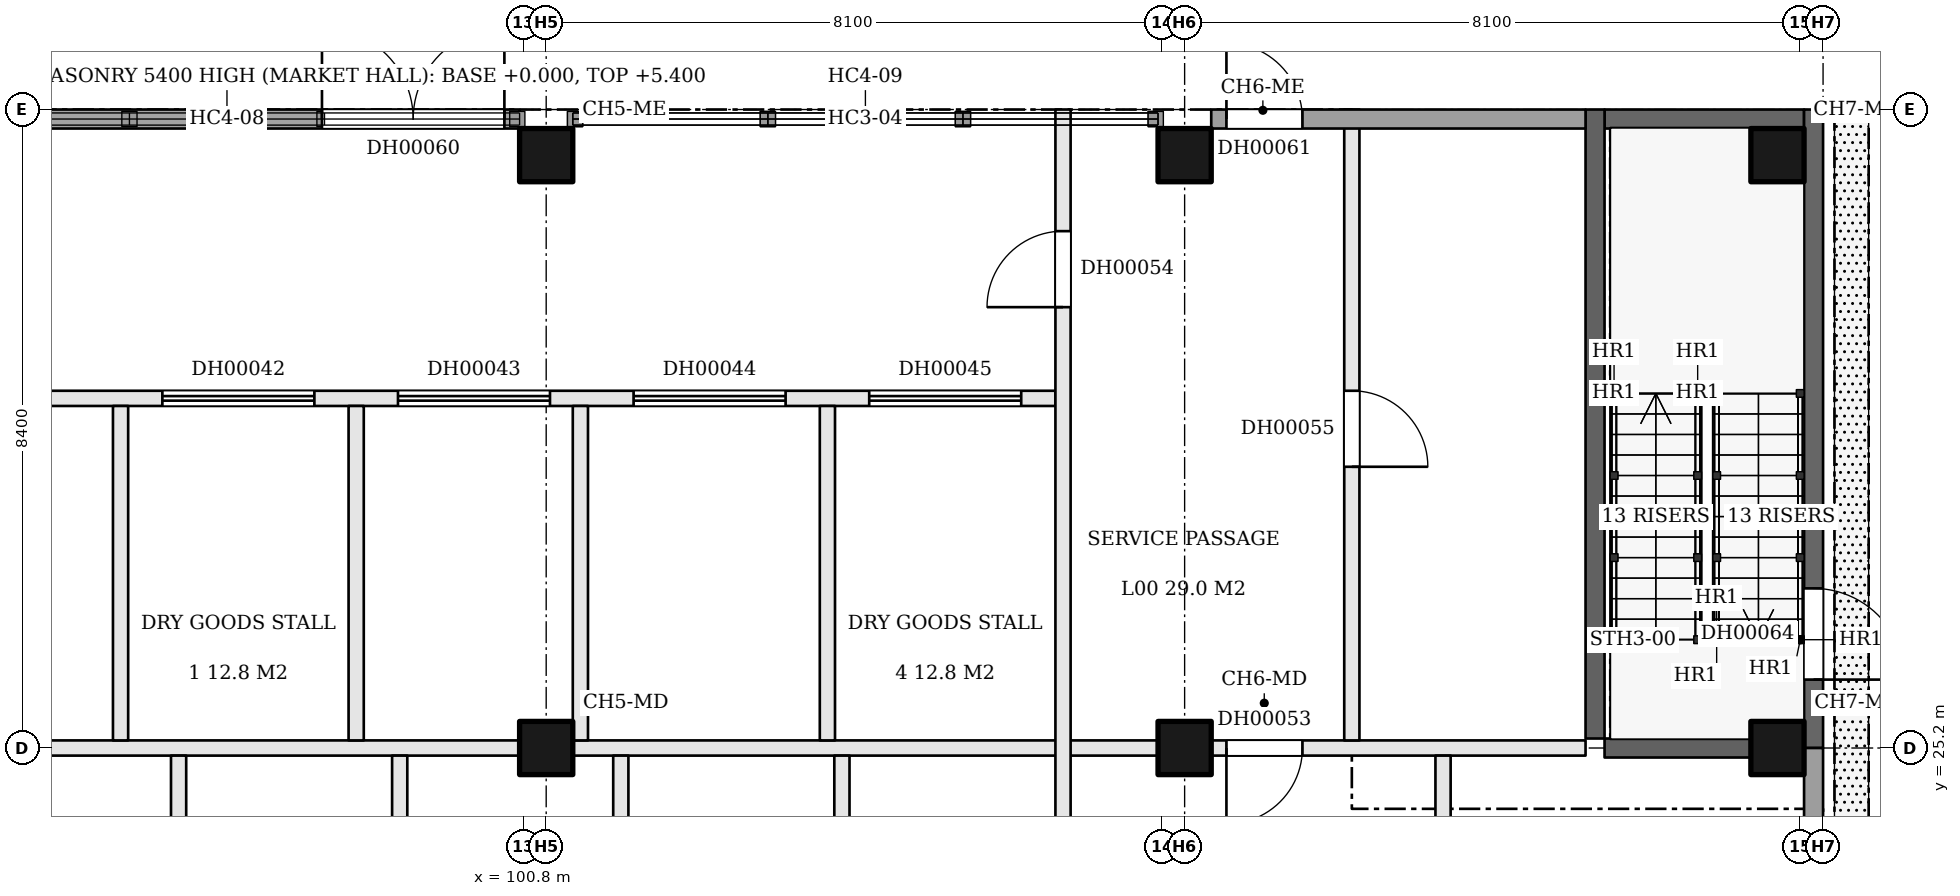
"""IFC4 building model, lengths in metres.
Left out: names, types, materials, properties, quantities, classifications, styles, units other than length and angle.
Written with IfcOpenShell. Run it as: python <this file> out.ifc"""

import sys

from ifc_helpers import new_model, si_unit, direction, frame, frame_2d, origin, origin_2d, place, context, subcontext, project, spatial, rectangle, extrude, element, fill, save


model = new_model("IFC4")
c1 = context("Model", 3, precision=1e-05, world=origin(), true_north=direction((0.0, 1.0)))
c2 = subcontext(c1, "Body", "Model", "MODEL_VIEW")
j1 = project(units=[si_unit("LENGTHUNIT", "METRE"), si_unit("PLANEANGLEUNIT", "RADIAN")], contexts=[c1])
p1 = place(None, origin())
s1 = spatial("IfcSite", under=j1, at=p1, CompositionType="ELEMENT")
p2 = place(p1, origin())
s2 = spatial("IfcBuilding", under=s1, at=p2, CompositionType="ELEMENT")
p3 = place(p2, origin())
s3 = spatial("IfcBuildingStorey", under=s2, at=p3, CompositionType="ELEMENT", Elevation=0.0)
for number, where, z_axis, x_axis in (
    (1, (101.1, 25.2, -0.2), (0.0, 0.0, 1.0), (1.0, 0.0, 0.0)),
    (2, (101.1, 33.0, -0.2), (0.0, 0.0, 1.0), (1.0, 0.0, 0.0)),
    (3, (109.5, 25.2, -0.2), (0.0, 0.0, 1.0), (1.0, 0.0, 0.0)),
    (4, (109.5, 33.0, -0.2), (0.0, 0.0, 1.0), (1.0, 0.0, 0.0)),
):
    element("IfcColumn", number, at=place(p3, frame(where, z_axis=z_axis, x_axis=x_axis)), inside=s3, PredefinedType="COLUMN", context=c2, shape_type="SweptSolid", body=[
        extrude(rectangle(XDim=0.7, YDim=0.7, at=origin_2d()), origin(), (0.0, 0.0, 1.0), 8.9),
    ])
for number, where, z_axis, x_axis in (
    (5, (117.3, 25.2, 0.0), (0.0, 0.0, 1.0), (1.0, 0.0, 0.0)),
    (6, (117.3, 33.0, 0.0), (0.0, 0.0, 1.0), (1.0, 0.0, 0.0)),
):
    element("IfcColumn", number, at=place(p3, frame(where, z_axis=z_axis, x_axis=x_axis)), inside=s3, PredefinedType="COLUMN", context=c2, shape_type="SweptSolid", body=[
        extrude(rectangle(XDim=0.7, YDim=0.7, at=origin_2d()), origin(), (0.0, 0.0, 1.0), 8.7),
    ])
for number, where, z_axis, x_axis in (
    (7, (93.05, 25.2, 0.0), (0.0, 0.0, 1.0), (1.0, 0.0, 0.0)),
    (8, (101.45, 25.2, 0.0), (0.0, 0.0, 1.0), (1.0, 0.0, 0.0)),
):
    element("IfcWall", number, at=place(p3, frame(where, z_axis=z_axis, x_axis=x_axis)), inside=s3, PredefinedType="PARTITIONING", context=c2, shape_type="SweptSolid", body=[
        extrude(rectangle(XDim=7.7, YDim=0.2, at=frame_2d((3.85, 0.0))), origin(), (0.0, 0.0, 1.0), 8.7),
    ])
p4 = place(p3, frame((109.85, 25.2, 0.0), z_axis=(0.0, 0.0, 1.0), x_axis=(1.0, 0.0, 0.0)))
e9 = element("IfcWall", 9, at=p4, inside=s3, PredefinedType="PARTITIONING", context=c2, shape_type="SweptSolid", body=[
    extrude(rectangle(XDim=4.925, YDim=0.2, at=frame_2d((2.462, 0.0))), origin(), (0.0, 0.0, 1.0), 8.7),
])
p5 = place(p4, frame((0.2, 0.0, 0.0)))
e10 = element("IfcOpeningElement", 10, at=p5, cuts=e9, PredefinedType="OPENING", context=c2, shape_type="SweptSolid", body=[
    extrude(rectangle(XDim=1.0, YDim=2.1, at=frame_2d((0.5, 1.05))), frame((0.0, 0.11, 0.0), z_axis=(0.0, -1.0, 0.0), x_axis=(1.0, 0.0, 0.0)), (0.0, 0.0, 1.0), 0.22),
])
p6 = place(p3, frame((115.025, 25.2, 0.0), z_axis=(0.0, 0.0, 1.0), x_axis=(1.0, 0.0, 0.0)))
e11 = element("IfcWall", 11, at=p6, inside=s3, PredefinedType="SHEAR", context=c2, shape_type="SweptSolid", body=[
    extrude(rectangle(XDim=1.925, YDim=0.25, at=frame_2d((0.962, 0.0))), origin(), (0.0, 0.0, 1.0), 8.7),
])
p7 = place(p3, frame((76.025, 29.8, 0.0), z_axis=(0.0, 0.0, 1.0), x_axis=(1.0, 0.0, 0.0)))
e12 = element("IfcWall", 12, at=p7, inside=s3, PredefinedType="PARTITIONING", context=c2, shape_type="SweptSolid", body=[
    extrude(rectangle(XDim=31.775, YDim=0.2, at=frame_2d((15.888, 0.0))), origin(), (0.0, 0.0, 1.0), 8.7),
])
p8 = place(p7, frame((1.538, 0.0, 0.0)))
e13 = element("IfcOpeningElement", 13, at=p8, cuts=e12, PredefinedType="OPENING", context=c2, shape_type="SweptSolid", body=[
    extrude(rectangle(XDim=1.0, YDim=2.1, at=frame_2d((0.5, 1.05))), frame((0.0, 0.11, 0.0), z_axis=(0.0, -1.0, 0.0), x_axis=(1.0, 0.0, 0.0)), (0.0, 0.0, 1.0), 0.22),
])
p9 = place(p7, frame((5.675, 0.0, 0.0)))
e14 = element("IfcOpeningElement", 14, at=p9, cuts=e12, PredefinedType="OPENING", context=c2, shape_type="SweptSolid", body=[
    extrude(rectangle(XDim=1.0, YDim=2.1, at=frame_2d((0.5, 1.05))), frame((0.0, 0.11, 0.0), z_axis=(0.0, -1.0, 0.0), x_axis=(1.0, 0.0, 0.0)), (0.0, 0.0, 1.0), 0.22),
])
p10 = place(p7, frame((9.175, 0.0, 0.0)))
e15 = element("IfcOpeningElement", 15, at=p10, cuts=e12, PredefinedType="OPENING", context=c2, shape_type="SweptSolid", body=[
    extrude(rectangle(XDim=1.0, YDim=2.1, at=frame_2d((0.5, 1.05))), frame((0.0, 0.11, 0.0), z_axis=(0.0, -1.0, 0.0), x_axis=(1.0, 0.0, 0.0)), (0.0, 0.0, 1.0), 0.22),
])
p11 = place(p7, frame((14.775, 0.0, 0.0)))
e16 = element("IfcOpeningElement", 16, at=p11, cuts=e12, PredefinedType="OPENING", context=c2, shape_type="SweptSolid", body=[
    extrude(rectangle(XDim=1.0, YDim=2.1, at=frame_2d((0.5, 1.05))), frame((0.0, 0.11, 0.0), z_axis=(0.0, -1.0, 0.0), x_axis=(1.0, 0.0, 0.0)), (0.0, 0.0, 1.0), 0.22),
])
p12 = place(p7, frame((20.025, 0.0, 0.0)))
e17 = element("IfcOpeningElement", 17, at=p12, cuts=e12, PredefinedType="OPENING", context=c2, shape_type="SweptSolid", body=[
    extrude(rectangle(XDim=2.0, YDim=2.4, at=frame_2d((1.0, 1.2))), frame((0.0, 0.11, 0.0), z_axis=(0.0, -1.0, 0.0), x_axis=(1.0, 0.0, 0.0)), (0.0, 0.0, 1.0), 0.22),
])
p13 = place(p7, frame((23.125, 0.0, 0.0)))
e18 = element("IfcOpeningElement", 18, at=p13, cuts=e12, PredefinedType="OPENING", context=c2, shape_type="SweptSolid", body=[
    extrude(rectangle(XDim=2.0, YDim=2.4, at=frame_2d((1.0, 1.2))), frame((0.0, 0.11, 0.0), z_axis=(0.0, -1.0, 0.0), x_axis=(1.0, 0.0, 0.0)), (0.0, 0.0, 1.0), 0.22),
])
p14 = place(p7, frame((26.225, 0.0, 0.0)))
e19 = element("IfcOpeningElement", 19, at=p14, cuts=e12, PredefinedType="OPENING", context=c2, shape_type="SweptSolid", body=[
    extrude(rectangle(XDim=2.0, YDim=2.4, at=frame_2d((1.0, 1.2))), frame((0.0, 0.11, 0.0), z_axis=(0.0, -1.0, 0.0), x_axis=(1.0, 0.0, 0.0)), (0.0, 0.0, 1.0), 0.22),
])
p15 = place(p7, frame((29.325, 0.0, 0.0)))
e20 = element("IfcOpeningElement", 20, at=p15, cuts=e12, PredefinedType="OPENING", context=c2, shape_type="SweptSolid", body=[
    extrude(rectangle(XDim=2.0, YDim=2.4, at=frame_2d((1.0, 1.2))), frame((0.0, 0.11, 0.0), z_axis=(0.0, -1.0, 0.0), x_axis=(1.0, 0.0, 0.0)), (0.0, 0.0, 1.0), 0.22),
])
p16 = place(p3, frame((93.05, 33.475, 0.0), z_axis=(0.0, 0.0, 1.0), x_axis=(1.0, 0.0, 0.0)))
e21 = element("IfcWall", 21, at=p16, inside=s3, PredefinedType="SOLIDWALL", context=c2, shape_type="SweptSolid", body=[
    extrude(rectangle(XDim=7.7, YDim=0.25, at=frame_2d((3.85, 0.0))), origin(), (0.0, 0.0, 1.0), 5.4),
])
p17 = place(p16, frame((5.1, 0.0, 0.0)))
e22 = element("IfcOpeningElement", 22, at=p17, cuts=e21, PredefinedType="OPENING", context=c2, shape_type="SweptSolid", body=[
    extrude(rectangle(XDim=2.4, YDim=2.4, at=frame_2d((1.2, 1.2))), frame((0.0, 0.135, 0.0), z_axis=(0.0, -1.0, 0.0), x_axis=(1.0, 0.0, 0.0)), (0.0, 0.0, 1.0), 0.27),
])
p18 = place(p3, frame((109.85, 33.475, 0.0), z_axis=(0.0, 0.0, 1.0), x_axis=(1.0, 0.0, 0.0)))
e23 = element("IfcWall", 23, at=p18, inside=s3, PredefinedType="SOLIDWALL", context=c2, shape_type="SweptSolid", body=[
    extrude(rectangle(XDim=4.925, YDim=0.25, at=frame_2d((2.462, 0.0))), origin(), (0.0, 0.0, 1.0), 8.7),
])
p19 = place(p18, frame((0.2, 0.0, 0.0)))
e24 = element("IfcOpeningElement", 24, at=p19, cuts=e23, PredefinedType="OPENING", context=c2, shape_type="SweptSolid", body=[
    extrude(rectangle(XDim=1.0, YDim=2.1, at=frame_2d((0.5, 1.05))), frame((0.0, 0.135, 0.0), z_axis=(0.0, -1.0, 0.0), x_axis=(1.0, 0.0, 0.0)), (0.0, 0.0, 1.0), 0.27),
])
p20 = place(p3, frame((115.025, 33.475, 0.0), z_axis=(0.0, 0.0, 1.0), x_axis=(1.0, 0.0, 0.0)))
e25 = element("IfcWall", 25, at=p20, inside=s3, PredefinedType="SHEAR", context=c2, shape_type="SweptSolid", body=[
    extrude(rectangle(XDim=2.625, YDim=0.25, at=frame_2d((1.312, 0.0))), origin(), (0.0, 0.0, 1.0), 8.7),
])
p21 = place(p3, frame((95.5, 25.3, 0.0), z_axis=(0.0, 0.0, 1.0), x_axis=(0.0, 1.0, 0.0)))
e26 = element("IfcWall", 26, at=p21, inside=s3, PredefinedType="PARTITIONING", context=c2, shape_type="SweptSolid", body=[
    extrude(rectangle(XDim=4.4, YDim=0.2, at=frame_2d((2.2, 0.0))), origin(), (0.0, 0.0, 1.0), 8.7),
])
p22 = place(p3, frame((96.264, 21.5, 0.0), z_axis=(0.0, 0.0, 1.0), x_axis=(0.0, 1.0, 0.0)))
e27 = element("IfcWall", 27, at=p22, inside=s3, PredefinedType="PARTITIONING", context=c2, shape_type="SweptSolid", body=[
    extrude(rectangle(XDim=3.6, YDim=0.2, at=frame_2d((1.8, 0.0))), origin(), (0.0, 0.0, 1.0), 8.7),
])
p23 = place(p3, frame((98.6, 25.3, 0.0), z_axis=(0.0, 0.0, 1.0), x_axis=(0.0, 1.0, 0.0)))
e28 = element("IfcWall", 28, at=p23, inside=s3, PredefinedType="PARTITIONING", context=c2, shape_type="SweptSolid", body=[
    extrude(rectangle(XDim=4.4, YDim=0.2, at=frame_2d((2.2, 0.0))), origin(), (0.0, 0.0, 1.0), 8.7),
])
p24 = place(p3, frame((99.173, 21.5, 0.0), z_axis=(0.0, 0.0, 1.0), x_axis=(0.0, 1.0, 0.0)))
e29 = element("IfcWall", 29, at=p24, inside=s3, PredefinedType="PARTITIONING", context=c2, shape_type="SweptSolid", body=[
    extrude(rectangle(XDim=3.6, YDim=0.2, at=frame_2d((1.8, 0.0))), origin(), (0.0, 0.0, 1.0), 8.7),
])
p25 = place(p3, frame((101.55, 25.3, 0.0), z_axis=(0.0, 0.0, 1.0), x_axis=(0.0, 1.0, 0.0)))
e30 = element("IfcWall", 30, at=p25, inside=s3, PredefinedType="PARTITIONING", context=c2, shape_type="SweptSolid", body=[
    extrude(rectangle(XDim=4.4, YDim=0.2, at=frame_2d((2.2, 0.0))), origin(), (0.0, 0.0, 1.0), 8.7),
])
p26 = place(p3, frame((102.082, 21.5, 0.0), z_axis=(0.0, 0.0, 1.0), x_axis=(0.0, 1.0, 0.0)))
e31 = element("IfcWall", 31, at=p26, inside=s3, PredefinedType="PARTITIONING", context=c2, shape_type="SweptSolid", body=[
    extrude(rectangle(XDim=3.6, YDim=0.2, at=frame_2d((1.8, 0.0))), origin(), (0.0, 0.0, 1.0), 8.7),
])
p27 = place(p3, frame((104.8, 25.3, 0.0), z_axis=(0.0, 0.0, 1.0), x_axis=(0.0, 1.0, 0.0)))
e32 = element("IfcWall", 32, at=p27, inside=s3, PredefinedType="PARTITIONING", context=c2, shape_type="SweptSolid", body=[
    extrude(rectangle(XDim=4.4, YDim=0.2, at=frame_2d((2.2, 0.0))), origin(), (0.0, 0.0, 1.0), 8.7),
])
p28 = place(p3, frame((104.991, 21.5, 0.0), z_axis=(0.0, 0.0, 1.0), x_axis=(0.0, 1.0, 0.0)))
e33 = element("IfcWall", 33, at=p28, inside=s3, PredefinedType="PARTITIONING", context=c2, shape_type="SweptSolid", body=[
    extrude(rectangle(XDim=3.6, YDim=0.2, at=frame_2d((1.8, 0.0))), origin(), (0.0, 0.0, 1.0), 8.7),
])
p29 = place(p3, frame((107.9, 8.5, 0.0), z_axis=(0.0, 0.0, 1.0), x_axis=(0.0, 1.0, 0.0)))
e34 = element("IfcWall", 34, at=p29, inside=s3, PredefinedType="PARTITIONING", context=c2, shape_type="SweptSolid", body=[
    extrude(rectangle(XDim=25.1, YDim=0.2, at=frame_2d((12.55, 0.0))), origin(), (0.0, 0.0, 1.0), 8.7),
])
p30 = place(p29, frame((3.8, 0.0, 0.0)))
e35 = element("IfcOpeningElement", 35, at=p30, cuts=e34, PredefinedType="OPENING", context=c2, shape_type="SweptSolid", body=[
    extrude(rectangle(XDim=1.0, YDim=2.1, at=frame_2d((0.5, 1.05))), frame((0.0, 0.11, 0.0), z_axis=(0.0, -1.0, 0.0), x_axis=(1.0, 0.0, 0.0)), (0.0, 0.0, 1.0), 0.22),
])
p31 = place(p29, frame((10.0, 0.0, 0.0)))
e36 = element("IfcOpeningElement", 36, at=p31, cuts=e34, PredefinedType="OPENING", context=c2, shape_type="SweptSolid", body=[
    extrude(rectangle(XDim=1.0, YDim=2.1, at=frame_2d((0.5, 1.05))), frame((0.0, 0.11, 0.0), z_axis=(0.0, -1.0, 0.0), x_axis=(1.0, 0.0, 0.0)), (0.0, 0.0, 1.0), 0.22),
])
p32 = place(p29, frame((22.5, 0.0, 0.0)))
e37 = element("IfcOpeningElement", 37, at=p32, cuts=e34, PredefinedType="OPENING", context=c2, shape_type="SweptSolid", body=[
    extrude(rectangle(XDim=1.0, YDim=2.1, at=frame_2d((0.5, 1.05))), frame((0.0, 0.11, 0.0), z_axis=(0.0, -1.0, 0.0), x_axis=(1.0, 0.0, 0.0)), (0.0, 0.0, 1.0), 0.22),
])
p33 = place(p3, frame((111.7, 25.3, 0.0), z_axis=(0.0, 0.0, 1.0), x_axis=(0.0, 1.0, 0.0)))
e38 = element("IfcWall", 38, at=p33, inside=s3, PredefinedType="PARTITIONING", context=c2, shape_type="SweptSolid", body=[
    extrude(rectangle(XDim=8.3, YDim=0.2, at=frame_2d((4.15, 0.0))), origin(), (0.0, 0.0, 1.0), 8.7),
])
p34 = place(p33, frame((3.6, 0.0, 0.0)))
e39 = element("IfcOpeningElement", 39, at=p34, cuts=e38, PredefinedType="OPENING", context=c2, shape_type="SweptSolid", body=[
    extrude(rectangle(XDim=1.0, YDim=2.1, at=frame_2d((0.5, 1.05))), frame((0.0, 0.11, 0.0), z_axis=(0.0, -1.0, 0.0), x_axis=(1.0, 0.0, 0.0)), (0.0, 0.0, 1.0), 0.22),
])
p35 = place(p3, frame((112.9, 16.4, 0.0), z_axis=(0.0, 0.0, 1.0), x_axis=(0.0, 1.0, 0.0)))
e40 = element("IfcWall", 40, at=p35, inside=s3, PredefinedType="PARTITIONING", context=c2, shape_type="SweptSolid", body=[
    extrude(rectangle(XDim=8.7, YDim=0.2, at=frame_2d((4.35, 0.0))), origin(), (0.0, 0.0, 1.0), 8.7),
])
p36 = place(p3, frame((114.9, 25.325, 0.0), z_axis=(0.0, 0.0, 1.0), x_axis=(0.0, 1.0, 0.0)))
e41 = element("IfcWall", 41, at=p36, inside=s3, PredefinedType="SHEAR", context=c2, shape_type="SweptSolid", body=[
    extrude(rectangle(XDim=8.275, YDim=0.25, at=frame_2d((4.138, 0.0))), origin(), (0.0, 0.0, 1.0), 8.7),
])
p37 = place(p3, frame((117.775, 8.4, 0.0), z_axis=(0.0, 0.0, 1.0), x_axis=(0.0, 1.0, 0.0)))
e42 = element("IfcWall", 42, at=p37, inside=s3, PredefinedType="SOLIDWALL", context=c2, shape_type="SweptSolid", body=[
    extrude(rectangle(XDim=16.8, YDim=0.25, at=frame_2d((8.4, 0.0))), origin(), (0.0, 0.0, 1.0), 8.7),
])
p38 = place(p37, frame((1.15, 0.0, 0.0)))
e43 = element("IfcOpeningElement", 43, at=p38, cuts=e42, PredefinedType="OPENING", context=c2, shape_type="SweptSolid", body=[
    extrude(rectangle(XDim=3.0, YDim=4.5, at=frame_2d((1.5, 2.25))), frame((0.0, 0.135, 0.0), z_axis=(0.0, -1.0, 0.0), x_axis=(1.0, 0.0, 0.0)), (0.0, 0.0, 1.0), 0.27),
])
p39 = place(p37, frame((4.65, 0.0, 0.0)))
e44 = element("IfcOpeningElement", 44, at=p39, cuts=e42, PredefinedType="OPENING", context=c2, shape_type="SweptSolid", body=[
    extrude(rectangle(XDim=3.0, YDim=4.5, at=frame_2d((1.5, 2.25))), frame((0.0, 0.135, 0.0), z_axis=(0.0, -1.0, 0.0), x_axis=(1.0, 0.0, 0.0)), (0.0, 0.0, 1.0), 0.27),
])
p40 = place(p3, frame((117.775, 25.2, 0.0), z_axis=(0.0, 0.0, 1.0), x_axis=(0.0, 1.0, 0.0)))
e45 = element("IfcWall", 45, at=p40, inside=s3, PredefinedType="SHEAR", context=c2, shape_type="SweptSolid", body=[
    extrude(rectangle(XDim=8.4, YDim=0.25, at=frame_2d((4.2, 0.0))), origin(), (0.0, 0.0, 1.0), 8.7),
])
p41 = place(p40, frame((0.9, 0.0, 0.0)))
e46 = element("IfcOpeningElement", 46, at=p41, cuts=e45, PredefinedType="OPENING", context=c2, shape_type="SweptSolid", body=[
    extrude(rectangle(XDim=1.2, YDim=2.1, at=frame_2d((0.6, 1.05))), frame((0.0, 0.135, 0.0), z_axis=(0.0, -1.0, 0.0), x_axis=(1.0, 0.0, 0.0)), (0.0, 0.0, 1.0), 0.27),
])
p42 = place(p12, origin())
e47 = element("IfcDoor", 47, at=p42, inside=s3, OperationType="ROLLINGUP", PredefinedType="DOOR", context=c2, shape_type="SweptSolid", body=[
    extrude(rectangle(XDim=2.0, YDim=2.4, at=frame_2d((1.0, 1.2))), frame((0.0, 0.025, 0.0), z_axis=(0.0, -1.0, 0.0), x_axis=(1.0, 0.0, 0.0)), (0.0, 0.0, 1.0), 0.05),
])
fill(e17, e47)
p43 = place(p13, origin())
e48 = element("IfcDoor", 48, at=p43, inside=s3, OperationType="ROLLINGUP", PredefinedType="DOOR", context=c2, shape_type="SweptSolid", body=[
    extrude(rectangle(XDim=2.0, YDim=2.4, at=frame_2d((1.0, 1.2))), frame((0.0, 0.025, 0.0), z_axis=(0.0, -1.0, 0.0), x_axis=(1.0, 0.0, 0.0)), (0.0, 0.0, 1.0), 0.05),
])
fill(e18, e48)
p44 = place(p14, origin())
e49 = element("IfcDoor", 49, at=p44, inside=s3, OperationType="ROLLINGUP", PredefinedType="DOOR", context=c2, shape_type="SweptSolid", body=[
    extrude(rectangle(XDim=2.0, YDim=2.4, at=frame_2d((1.0, 1.2))), frame((0.0, 0.025, 0.0), z_axis=(0.0, -1.0, 0.0), x_axis=(1.0, 0.0, 0.0)), (0.0, 0.0, 1.0), 0.05),
])
fill(e19, e49)
p45 = place(p15, origin())
e50 = element("IfcDoor", 50, at=p45, inside=s3, OperationType="ROLLINGUP", PredefinedType="DOOR", context=c2, shape_type="SweptSolid", body=[
    extrude(rectangle(XDim=2.0, YDim=2.4, at=frame_2d((1.0, 1.2))), frame((0.0, 0.025, 0.0), z_axis=(0.0, -1.0, 0.0), x_axis=(1.0, 0.0, 0.0)), (0.0, 0.0, 1.0), 0.05),
])
fill(e20, e50)
p46 = place(p5, frame((1.0, 0.0, 0.0), z_axis=(0.0, 0.0, 1.0), x_axis=(-1.0, 0.0, 0.0)))
e51 = element("IfcDoor", 51, at=p46, inside=s3, OperationType="SINGLE_SWING_RIGHT", PredefinedType="DOOR", context=c2, shape_type="SweptSolid", body=[
    extrude(rectangle(XDim=1.0, YDim=2.1, at=frame_2d((0.5, 1.05))), frame((0.0, 0.025, 0.0), z_axis=(0.0, -1.0, 0.0), x_axis=(1.0, 0.0, 0.0)), (0.0, 0.0, 1.0), 0.05),
])
fill(e10, e51)
p47 = place(p32, origin())
e52 = element("IfcDoor", 52, at=p47, inside=s3, OperationType="SINGLE_SWING_LEFT", PredefinedType="DOOR", context=c2, shape_type="SweptSolid", body=[
    extrude(rectangle(XDim=1.0, YDim=2.1, at=frame_2d((0.5, 1.05))), frame((0.0, 0.025, 0.0), z_axis=(0.0, -1.0, 0.0), x_axis=(1.0, 0.0, 0.0)), (0.0, 0.0, 1.0), 0.05),
])
fill(e37, e52)
p48 = place(p34, frame((1.0, 0.0, 0.0), z_axis=(0.0, 0.0, 1.0), x_axis=(-1.0, 0.0, 0.0)))
e53 = element("IfcDoor", 53, at=p48, inside=s3, OperationType="SINGLE_SWING_RIGHT", PredefinedType="DOOR", context=c2, shape_type="SweptSolid", body=[
    extrude(rectangle(XDim=1.0, YDim=2.1, at=frame_2d((0.5, 1.05))), frame((0.0, 0.025, 0.0), z_axis=(0.0, -1.0, 0.0), x_axis=(1.0, 0.0, 0.0)), (0.0, 0.0, 1.0), 0.05),
])
fill(e39, e53)
p49 = place(p17, origin())
e54 = element("IfcDoor", 54, at=p49, inside=s3, OperationType="DOUBLE_DOOR_SINGLE_SWING", PredefinedType="DOOR", context=c2, shape_type="SweptSolid", body=[
    extrude(rectangle(XDim=2.4, YDim=2.4, at=frame_2d((1.2, 1.2))), frame((0.0, 0.025, 0.0), z_axis=(0.0, -1.0, 0.0), x_axis=(1.0, 0.0, 0.0)), (0.0, 0.0, 1.0), 0.05),
])
fill(e22, e54)
p50 = place(p19, origin())
e55 = element("IfcDoor", 55, at=p50, inside=s3, OperationType="SINGLE_SWING_LEFT", PredefinedType="DOOR", context=c2, shape_type="SweptSolid", body=[
    extrude(rectangle(XDim=1.0, YDim=2.1, at=frame_2d((0.5, 1.05))), frame((0.0, 0.025, 0.0), z_axis=(0.0, -1.0, 0.0), x_axis=(1.0, 0.0, 0.0)), (0.0, 0.0, 1.0), 0.05),
])
fill(e24, e55)
p51 = place(p41, frame((1.2, 0.0, 0.0), z_axis=(0.0, 0.0, 1.0), x_axis=(-1.0, 0.0, 0.0)))
e56 = element("IfcDoor", 56, at=p51, inside=s3, OperationType="SINGLE_SWING_RIGHT", PredefinedType="DOOR", context=c2, shape_type="SweptSolid", body=[
    extrude(rectangle(XDim=1.2, YDim=2.1, at=frame_2d((0.6, 1.05))), frame((0.0, 0.025, 0.0), z_axis=(0.0, -1.0, 0.0), x_axis=(1.0, 0.0, 0.0)), (0.0, 0.0, 1.0), 0.05),
])
fill(e46, e56)
save(model, sys.argv[1])
